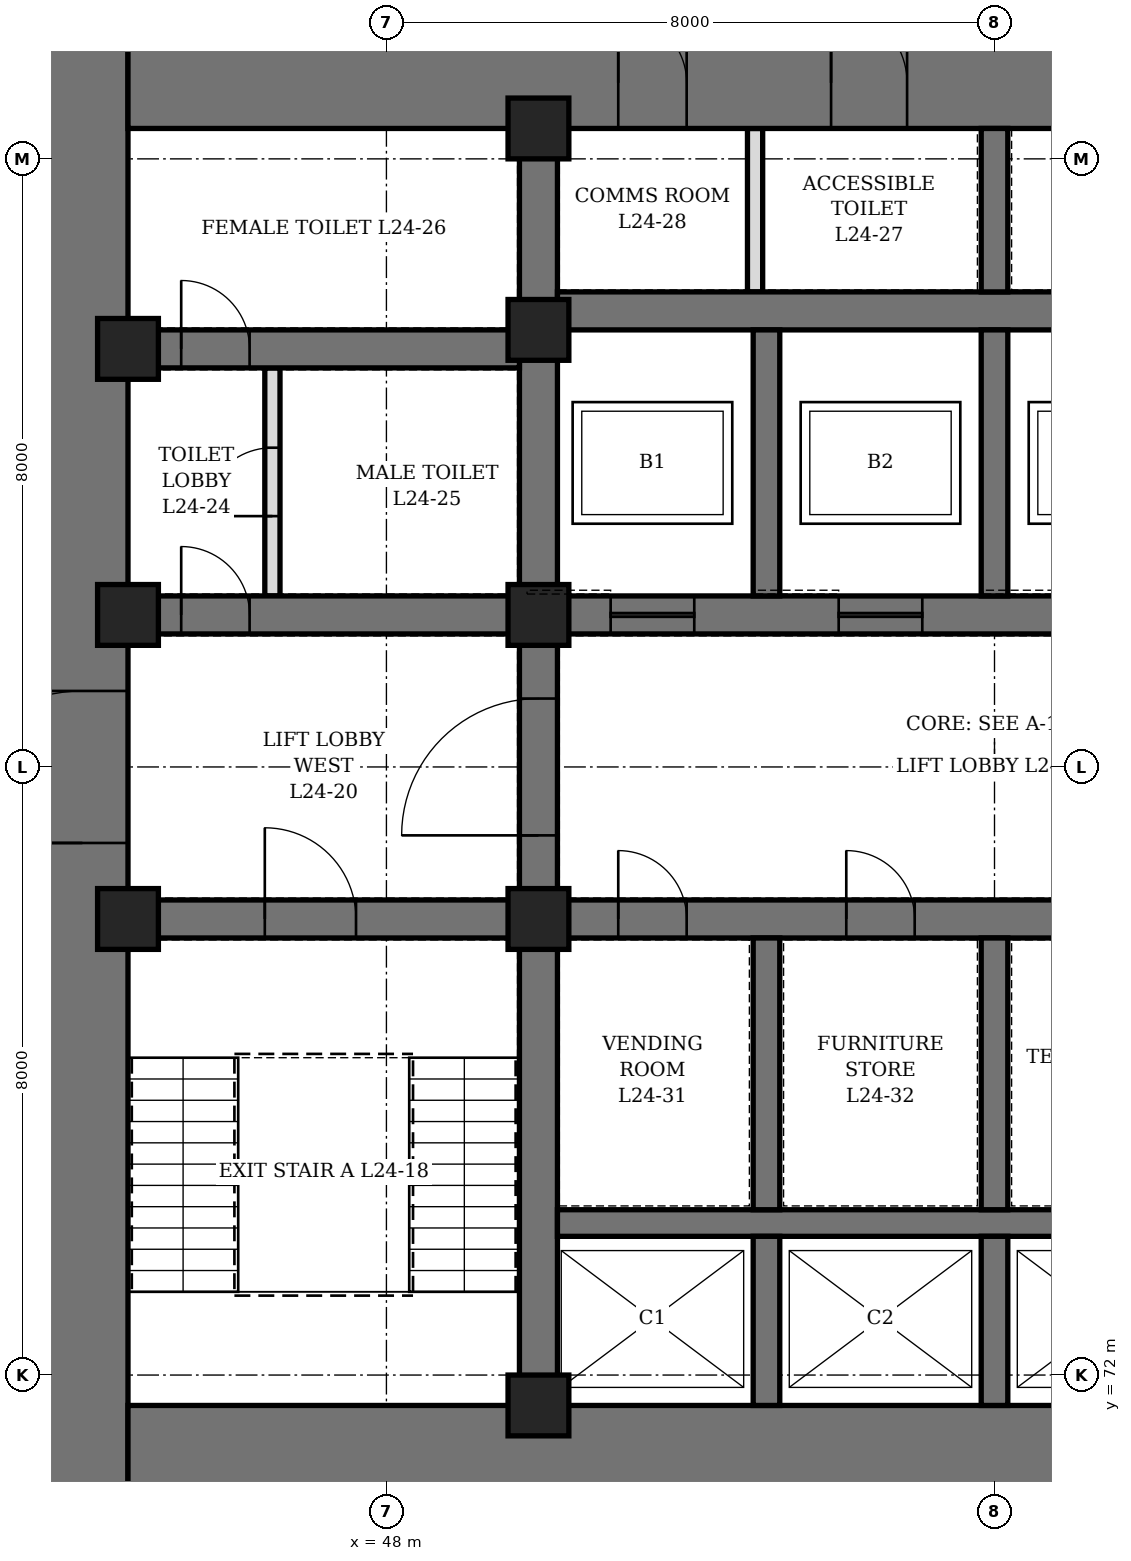
"""IFC4 building model, lengths in metres.
Left out: names, types, materials, properties, quantities, classifications, styles, units other than length and angle.
Written with IfcOpenShell. Run it as: python <this file> out.ifc"""

import sys

from ifc_helpers import new_model, si_unit, direction, frame, frame_2d, origin, origin_2d, place, context, subcontext, project, spatial, rectangle, hollow_rectangle, extrude, element, fill, save


model = new_model("IFC4")
c1 = context("Model", 3, precision=1e-05, world=origin(), true_north=direction((0.0, 1.0)))
c2 = subcontext(c1, "Body", "Model", "MODEL_VIEW")
j1 = project(units=[si_unit("LENGTHUNIT", "METRE"), si_unit("PLANEANGLEUNIT", "RADIAN")], contexts=[c1])
p1 = place(None, origin())
s1 = spatial("IfcSite", under=j1, at=p1, CompositionType="ELEMENT")
p2 = place(p1, origin())
s2 = spatial("IfcBuilding", under=s1, at=p2, CompositionType="ELEMENT")
p3 = place(p2, frame((0.0, 0.0, 112.3)))
s3 = spatial("IfcBuildingStorey", under=s2, at=p3, CompositionType="ELEMENT", Elevation=112.3)
p4 = place(p3, frame((44.0, 70.4, 0.0), z_axis=(0.0, 0.0, 1.0), x_axis=(0.0, 1.0, 0.0)))
e1 = element("IfcWall", 1, at=p4, inside=s3, PredefinedType="SHEAR", context=c2, shape_type="SweptSolid", body=[
    extrude(rectangle(XDim=19.2, YDim=1.2, at=frame_2d((9.6, 0.0))), origin(), (0.0, 0.0, 1.0), 4.2),
])
p5 = place(p4, frame((8.6, 0.0, 0.0)))
e2 = element("IfcOpeningElement", 2, at=p5, cuts=e1, PredefinedType="OPENING", context=c2, shape_type="SweptSolid", body=[
    extrude(rectangle(XDim=2.0, YDim=2.4, at=frame_2d((1.0, 1.2))), frame((0.0, 0.61, 0.0), z_axis=(0.0, -1.0, 0.0), x_axis=(1.0, 0.0, 0.0)), (0.0, 0.0, 1.0), 1.22),
])
p6 = place(p3, frame((44.6, 71.0, 0.0), z_axis=(0.0, 0.0, 1.0), x_axis=(1.0, 0.0, 0.0)))
e3 = element("IfcWall", 3, at=p6, inside=s3, PredefinedType="SHEAR", context=c2, shape_type="SweptSolid", body=[
    extrude(rectangle(XDim=22.8, YDim=1.2, at=frame_2d((11.4, 0.0))), origin(), (0.0, 0.0, 1.0), 4.2),
])
p7 = place(p3, frame((44.6, 89.0, 0.0), z_axis=(0.0, 0.0, 1.0), x_axis=(1.0, 0.0, 0.0)))
e4 = element("IfcWall", 4, at=p7, inside=s3, PredefinedType="SHEAR", context=c2, shape_type="SweptSolid", body=[
    extrude(rectangle(XDim=22.8, YDim=1.2, at=frame_2d((11.4, 0.0))), origin(), (0.0, 0.0, 1.0), 4.2),
])
p8 = place(p7, frame((9.25, 0.0, 0.0)))
e5 = element("IfcOpeningElement", 5, at=p8, cuts=e4, PredefinedType="OPENING", context=c2, shape_type="SweptSolid", body=[
    extrude(rectangle(XDim=1.0, YDim=2.1, at=frame_2d((0.5, 1.05))), frame((0.0, 0.61, 0.0), z_axis=(0.0, -1.0, 0.0), x_axis=(1.0, 0.0, 0.0)), (0.0, 0.0, 1.0), 1.22),
])
p9 = place(p7, frame((6.45, 0.0, 0.0)))
e6 = element("IfcOpeningElement", 6, at=p9, cuts=e4, PredefinedType="OPENING", context=c2, shape_type="SweptSolid", body=[
    extrude(rectangle(XDim=0.9, YDim=2.1, at=frame_2d((0.45, 1.05))), frame((0.0, 0.61, 0.0), z_axis=(0.0, -1.0, 0.0), x_axis=(1.0, 0.0, 0.0)), (0.0, 0.0, 1.0), 1.22),
])
p10 = place(p7, frame((13.025, 0.0, 0.0)))
e7 = element("IfcOpeningElement", 7, at=p10, cuts=e4, PredefinedType="OPENING", context=c2, shape_type="SweptSolid", body=[
    extrude(rectangle(XDim=0.9, YDim=2.1, at=frame_2d((0.45, 1.05))), frame((0.0, 0.61, 0.0), z_axis=(0.0, -1.0, 0.0), x_axis=(1.0, 0.0, 0.0)), (0.0, 0.0, 1.0), 1.22),
])
p11 = place(p3, frame((50.0, 71.6, 0.0), z_axis=(0.0, 0.0, 1.0), x_axis=(0.0, 1.0, 0.0)))
e8 = element("IfcWall", 8, at=p11, inside=s3, PredefinedType="SHEAR", context=c2, shape_type="SweptSolid", body=[
    extrude(rectangle(XDim=16.8, YDim=0.5, at=frame_2d((8.4, 0.0))), origin(), (0.0, 0.0, 1.0), 4.2),
])
p12 = place(p11, frame((7.5, 0.0, 0.0)))
e9 = element("IfcOpeningElement", 9, at=p12, cuts=e8, PredefinedType="OPENING", context=c2, shape_type="SweptSolid", body=[
    extrude(rectangle(XDim=1.8, YDim=2.4, at=frame_2d((0.9, 1.2))), frame((0.0, 0.26, 0.0), z_axis=(0.0, -1.0, 0.0), x_axis=(1.0, 0.0, 0.0)), (0.0, 0.0, 1.0), 0.52),
])
p13 = place(p3, frame((44.6, 78.0, 0.0), z_axis=(0.0, 0.0, 1.0), x_axis=(1.0, 0.0, 0.0)))
e10 = element("IfcWall", 10, at=p13, inside=s3, PredefinedType="SHEAR", context=c2, shape_type="SweptSolid", body=[
    extrude(rectangle(XDim=5.15, YDim=0.5, at=frame_2d((2.575, 0.0))), origin(), (0.0, 0.0, 1.0), 4.2),
])
p14 = place(p13, frame((1.8, 0.0, 0.0)))
e11 = element("IfcOpeningElement", 11, at=p14, cuts=e10, PredefinedType="OPENING", context=c2, shape_type="SweptSolid", body=[
    extrude(rectangle(XDim=1.2, YDim=2.1, at=frame_2d((0.6, 1.05))), frame((0.0, 0.26, 0.0), z_axis=(0.0, -1.0, 0.0), x_axis=(1.0, 0.0, 0.0)), (0.0, 0.0, 1.0), 0.52),
])
p15 = place(p3, frame((44.6, 82.0, 0.0), z_axis=(0.0, 0.0, 1.0), x_axis=(1.0, 0.0, 0.0)))
e12 = element("IfcWall", 12, at=p15, inside=s3, PredefinedType="SHEAR", context=c2, shape_type="SweptSolid", body=[
    extrude(rectangle(XDim=5.15, YDim=0.5, at=frame_2d((2.575, 0.0))), origin(), (0.0, 0.0, 1.0), 4.2),
])
p16 = place(p15, frame((0.7, 0.0, 0.0)))
e13 = element("IfcOpeningElement", 13, at=p16, cuts=e12, PredefinedType="OPENING", context=c2, shape_type="SweptSolid", body=[
    extrude(rectangle(XDim=0.9, YDim=2.1, at=frame_2d((0.45, 1.05))), frame((0.0, 0.26, 0.0), z_axis=(0.0, -1.0, 0.0), x_axis=(1.0, 0.0, 0.0)), (0.0, 0.0, 1.0), 0.52),
])
p17 = place(p3, frame((44.6, 85.5, 0.0), z_axis=(0.0, 0.0, 1.0), x_axis=(1.0, 0.0, 0.0)))
e14 = element("IfcWall", 14, at=p17, inside=s3, PredefinedType="SHEAR", context=c2, shape_type="SweptSolid", body=[
    extrude(rectangle(XDim=5.15, YDim=0.5, at=frame_2d((2.575, 0.0))), origin(), (0.0, 0.0, 1.0), 4.2),
])
p18 = place(p17, frame((0.7, 0.0, 0.0)))
e15 = element("IfcOpeningElement", 15, at=p18, cuts=e14, PredefinedType="OPENING", context=c2, shape_type="SweptSolid", body=[
    extrude(rectangle(XDim=0.9, YDim=2.1, at=frame_2d((0.45, 1.05))), frame((0.0, 0.26, 0.0), z_axis=(0.0, -1.0, 0.0), x_axis=(1.0, 0.0, 0.0)), (0.0, 0.0, 1.0), 0.52),
])
p19 = place(p3, frame((50.25, 78.0, 0.0), z_axis=(0.0, 0.0, 1.0), x_axis=(1.0, 0.0, 0.0)))
e16 = element("IfcWall", 16, at=p19, inside=s3, PredefinedType="SHEAR", context=c2, shape_type="SweptSolid", body=[
    extrude(rectangle(XDim=11.5, YDim=0.5, at=frame_2d((5.75, 0.0))), origin(), (0.0, 0.0, 1.0), 4.2),
])
p20 = place(p19, frame((0.8, 0.0, 0.0)))
e17 = element("IfcOpeningElement", 17, at=p20, cuts=e16, PredefinedType="OPENING", context=c2, shape_type="SweptSolid", body=[
    extrude(rectangle(XDim=0.9, YDim=2.1, at=frame_2d((0.45, 1.05))), frame((0.0, 0.26, 0.0), z_axis=(0.0, -1.0, 0.0), x_axis=(1.0, 0.0, 0.0)), (0.0, 0.0, 1.0), 0.52),
])
p21 = place(p19, frame((3.8, 0.0, 0.0)))
e18 = element("IfcOpeningElement", 18, at=p21, cuts=e16, PredefinedType="OPENING", context=c2, shape_type="SweptSolid", body=[
    extrude(rectangle(XDim=0.9, YDim=2.1, at=frame_2d((0.45, 1.05))), frame((0.0, 0.26, 0.0), z_axis=(0.0, -1.0, 0.0), x_axis=(1.0, 0.0, 0.0)), (0.0, 0.0, 1.0), 0.52),
])
p22 = place(p19, frame((6.8, 0.0, 0.0)))
e19 = element("IfcOpeningElement", 19, at=p22, cuts=e16, PredefinedType="OPENING", context=c2, shape_type="SweptSolid", body=[
    extrude(rectangle(XDim=0.9, YDim=2.1, at=frame_2d((0.45, 1.05))), frame((0.0, 0.26, 0.0), z_axis=(0.0, -1.0, 0.0), x_axis=(1.0, 0.0, 0.0)), (0.0, 0.0, 1.0), 0.52),
])
p23 = place(p19, frame((9.8, 0.0, 0.0)))
e20 = element("IfcOpeningElement", 20, at=p23, cuts=e16, PredefinedType="OPENING", context=c2, shape_type="SweptSolid", body=[
    extrude(rectangle(XDim=0.9, YDim=2.1, at=frame_2d((0.45, 1.05))), frame((0.0, 0.26, 0.0), z_axis=(0.0, -1.0, 0.0), x_axis=(1.0, 0.0, 0.0)), (0.0, 0.0, 1.0), 0.52),
])
p24 = place(p3, frame((50.25, 82.0, 0.0), z_axis=(0.0, 0.0, 1.0), x_axis=(1.0, 0.0, 0.0)))
e21 = element("IfcWall", 21, at=p24, inside=s3, PredefinedType="SHEAR", context=c2, shape_type="SweptSolid", body=[
    extrude(rectangle(XDim=11.5, YDim=0.5, at=frame_2d((5.75, 0.0))), origin(), (0.0, 0.0, 1.0), 4.2),
])
p25 = place(p24, frame((0.7, 0.0, 0.0)))
e22 = element("IfcOpeningElement", 22, at=p25, cuts=e21, PredefinedType="OPENING", context=c2, shape_type="SweptSolid", body=[
    extrude(rectangle(XDim=1.1, YDim=2.2, at=frame_2d((0.55, 1.1))), frame((0.0, 0.26, 0.0), z_axis=(0.0, -1.0, 0.0), x_axis=(1.0, 0.0, 0.0)), (0.0, 0.0, 1.0), 0.52),
])
p26 = place(p24, frame((3.7, 0.0, 0.0)))
e23 = element("IfcOpeningElement", 23, at=p26, cuts=e21, PredefinedType="OPENING", context=c2, shape_type="SweptSolid", body=[
    extrude(rectangle(XDim=1.1, YDim=2.2, at=frame_2d((0.55, 1.1))), frame((0.0, 0.26, 0.0), z_axis=(0.0, -1.0, 0.0), x_axis=(1.0, 0.0, 0.0)), (0.0, 0.0, 1.0), 0.52),
])
p27 = place(p24, frame((6.7, 0.0, 0.0)))
e24 = element("IfcOpeningElement", 24, at=p27, cuts=e21, PredefinedType="OPENING", context=c2, shape_type="SweptSolid", body=[
    extrude(rectangle(XDim=1.1, YDim=2.2, at=frame_2d((0.55, 1.1))), frame((0.0, 0.26, 0.0), z_axis=(0.0, -1.0, 0.0), x_axis=(1.0, 0.0, 0.0)), (0.0, 0.0, 1.0), 0.52),
])
p28 = place(p24, frame((9.7, 0.0, 0.0)))
e25 = element("IfcOpeningElement", 25, at=p28, cuts=e21, PredefinedType="OPENING", context=c2, shape_type="SweptSolid", body=[
    extrude(rectangle(XDim=1.1, YDim=2.2, at=frame_2d((0.55, 1.1))), frame((0.0, 0.26, 0.0), z_axis=(0.0, -1.0, 0.0), x_axis=(1.0, 0.0, 0.0)), (0.0, 0.0, 1.0), 0.52),
])
p29 = place(p3, frame((50.25, 86.0, 0.0), z_axis=(0.0, 0.0, 1.0), x_axis=(1.0, 0.0, 0.0)))
e26 = element("IfcWall", 26, at=p29, inside=s3, PredefinedType="SHEAR", context=c2, shape_type="SweptSolid", body=[
    extrude(rectangle(XDim=11.5, YDim=0.5, at=frame_2d((5.75, 0.0))), origin(), (0.0, 0.0, 1.0), 4.2),
])
p30 = place(p3, frame((50.25, 74.0, 0.0), z_axis=(0.0, 0.0, 1.0), x_axis=(1.0, 0.0, 0.0)))
e27 = element("IfcWall", 27, at=p30, inside=s3, PredefinedType="SHEAR", context=c2, shape_type="SweptSolid", body=[
    extrude(rectangle(XDim=11.5, YDim=0.35, at=frame_2d((5.75, 0.0))), origin(), (0.0, 0.0, 1.0), 4.2),
])
p31 = place(p3, frame((53.0, 71.6, 0.0), z_axis=(0.0, 0.0, 1.0), x_axis=(0.0, 1.0, 0.0)))
e28 = element("IfcWall", 28, at=p31, inside=s3, PredefinedType="SHEAR", context=c2, shape_type="SweptSolid", body=[
    extrude(rectangle(XDim=2.225, YDim=0.35, at=frame_2d((1.112, 0.0))), origin(), (0.0, 0.0, 1.0), 4.2),
])
p32 = place(p3, frame((53.0, 74.175, 0.0), z_axis=(0.0, 0.0, 1.0), x_axis=(0.0, 1.0, 0.0)))
e29 = element("IfcWall", 29, at=p32, inside=s3, PredefinedType="SHEAR", context=c2, shape_type="SweptSolid", body=[
    extrude(rectangle(XDim=3.575, YDim=0.35, at=frame_2d((1.788, 0.0))), origin(), (0.0, 0.0, 1.0), 4.2),
])
p33 = place(p3, frame((53.0, 82.25, 0.0), z_axis=(0.0, 0.0, 1.0), x_axis=(0.0, 1.0, 0.0)))
e30 = element("IfcWall", 30, at=p33, inside=s3, PredefinedType="SHEAR", context=c2, shape_type="SweptSolid", body=[
    extrude(rectangle(XDim=3.5, YDim=0.35, at=frame_2d((1.75, 0.0))), origin(), (0.0, 0.0, 1.0), 4.2),
])
p34 = place(p3, frame((56.0, 71.6, 0.0), z_axis=(0.0, 0.0, 1.0), x_axis=(0.0, 1.0, 0.0)))
e31 = element("IfcWall", 31, at=p34, inside=s3, PredefinedType="SHEAR", context=c2, shape_type="SweptSolid", body=[
    extrude(rectangle(XDim=2.225, YDim=0.35, at=frame_2d((1.112, 0.0))), origin(), (0.0, 0.0, 1.0), 4.2),
])
p35 = place(p3, frame((56.0, 74.175, 0.0), z_axis=(0.0, 0.0, 1.0), x_axis=(0.0, 1.0, 0.0)))
e32 = element("IfcWall", 32, at=p35, inside=s3, PredefinedType="SHEAR", context=c2, shape_type="SweptSolid", body=[
    extrude(rectangle(XDim=3.575, YDim=0.35, at=frame_2d((1.788, 0.0))), origin(), (0.0, 0.0, 1.0), 4.2),
])
p36 = place(p3, frame((56.0, 82.25, 0.0), z_axis=(0.0, 0.0, 1.0), x_axis=(0.0, 1.0, 0.0)))
e33 = element("IfcWall", 33, at=p36, inside=s3, PredefinedType="SHEAR", context=c2, shape_type="SweptSolid", body=[
    extrude(rectangle(XDim=3.5, YDim=0.35, at=frame_2d((1.75, 0.0))), origin(), (0.0, 0.0, 1.0), 4.2),
])
p37 = place(p3, frame((56.0, 86.25, 0.0), z_axis=(0.0, 0.0, 1.0), x_axis=(0.0, 1.0, 0.0)))
e34 = element("IfcWall", 34, at=p37, inside=s3, PredefinedType="SHEAR", context=c2, shape_type="SweptSolid", body=[
    extrude(rectangle(XDim=2.15, YDim=0.35, at=frame_2d((1.075, 0.0))), origin(), (0.0, 0.0, 1.0), 4.2),
])
for number, where, z_axis, x_axis in (
    (35, (44.6, 78.0, 0.0), (0.0, 0.0, 1.0), (1.0, 0.0, 0.0)),
    (36, (44.6, 82.0, 0.0), (0.0, 0.0, 1.0), (1.0, 0.0, 0.0)),
    (37, (44.6, 85.5, 0.0), (0.0, 0.0, 1.0), (1.0, 0.0, 0.0)),
    (38, (50.0, 71.6, 0.0), (0.0, 0.0, 1.0), (1.0, 0.0, 0.0)),
    (39, (50.0, 78.0, 0.0), (0.0, 0.0, 1.0), (1.0, 0.0, 0.0)),
    (40, (50.0, 82.0, 0.0), (0.0, 0.0, 1.0), (1.0, 0.0, 0.0)),
    (41, (50.0, 85.75, 0.0), (0.0, 0.0, 1.0), (1.0, 0.0, 0.0)),
    (42, (50.0, 88.4, 0.0), (0.0, 0.0, 1.0), (1.0, 0.0, 0.0)),
):
    element("IfcColumn", number, at=place(p3, frame(where, z_axis=z_axis, x_axis=x_axis)), inside=s3, PredefinedType="COLUMN", context=c2, shape_type="SweptSolid", body=[
        extrude(hollow_rectangle(XDim=0.8, YDim=0.8, WallThickness=0.1, at=origin_2d()), origin(), (0.0, 0.0, 1.0), 4.2),
    ])
p38 = place(p3, frame((46.5, 82.25, 0.0), z_axis=(0.0, 0.0, 1.0), x_axis=(0.0, 1.0, 0.0)))
e43 = element("IfcWall", 43, at=p38, inside=s3, PredefinedType="PARTITIONING", context=c2, shape_type="SweptSolid", body=[
    extrude(rectangle(XDim=3.0, YDim=0.2, at=frame_2d((1.5, 0.0))), origin(), (0.0, 0.0, 1.0), 4.04),
])
p39 = place(p38, frame((1.05, 0.0, 0.0)))
e44 = element("IfcOpeningElement", 44, at=p39, cuts=e43, PredefinedType="OPENING", context=c2, shape_type="SweptSolid", body=[
    extrude(rectangle(XDim=0.9, YDim=2.1, at=frame_2d((0.45, 1.05))), frame((0.0, 0.11, 0.0), z_axis=(0.0, -1.0, 0.0), x_axis=(1.0, 0.0, 0.0)), (0.0, 0.0, 1.0), 0.22),
])
p40 = place(p3, frame((52.85, 86.25, 0.0), z_axis=(0.0, 0.0, 1.0), x_axis=(0.0, 1.0, 0.0)))
e45 = element("IfcWall", 45, at=p40, inside=s3, PredefinedType="PARTITIONING", context=c2, shape_type="SweptSolid", body=[
    extrude(rectangle(XDim=2.15, YDim=0.2, at=frame_2d((1.075, 0.0))), origin(), (0.0, 0.0, 1.0), 2.54),
])
p41 = place(p16, origin())
e46 = element("IfcDoor", 46, at=p41, inside=s3, OperationType="SINGLE_SWING_LEFT", PredefinedType="DOOR", context=c2, shape_type="SweptSolid", body=[
    extrude(rectangle(XDim=0.9, YDim=2.1, at=frame_2d((0.45, 1.05))), frame((0.0, 0.25, 0.0), z_axis=(0.0, -1.0, 0.0), x_axis=(1.0, 0.0, 0.0)), (0.0, 0.0, 1.0), 0.5),
])
fill(e13, e46)
p42 = place(p39, origin())
e47 = element("IfcDoor", 47, at=p42, inside=s3, OperationType="SINGLE_SWING_RIGHT", PredefinedType="DOOR", context=c2, shape_type="SweptSolid", body=[
    extrude(rectangle(XDim=0.9, YDim=2.1, at=frame_2d((0.45, 1.05))), frame((0.0, 0.1, 0.0), z_axis=(0.0, -1.0, 0.0), x_axis=(1.0, 0.0, 0.0)), (0.0, 0.0, 1.0), 0.199),
])
fill(e44, e47)
p43 = place(p18, origin())
e48 = element("IfcDoor", 48, at=p43, inside=s3, OperationType="SINGLE_SWING_RIGHT", PredefinedType="DOOR", context=c2, shape_type="SweptSolid", body=[
    extrude(rectangle(XDim=0.9, YDim=2.1, at=frame_2d((0.45, 1.05))), frame((0.0, 0.25, 0.0), z_axis=(0.0, -1.0, 0.0), x_axis=(1.0, 0.0, 0.0)), (0.0, 0.0, 1.0), 0.5),
])
fill(e15, e48)
p44 = place(p8, origin())
e49 = element("IfcDoor", 49, at=p44, inside=s3, OperationType="SINGLE_SWING_LEFT", PredefinedType="DOOR", context=c2, shape_type="SweptSolid", body=[
    extrude(rectangle(XDim=1.0, YDim=2.1, at=frame_2d((0.5, 1.05))), frame((0.0, 0.35, 0.0), z_axis=(0.0, -1.0, 0.0), x_axis=(1.0, 0.0, 0.0)), (0.0, 0.0, 1.0), 0.7),
])
fill(e5, e49)
p45 = place(p9, origin())
e50 = element("IfcDoor", 50, at=p45, inside=s3, OperationType="SINGLE_SWING_LEFT", PredefinedType="DOOR", context=c2, shape_type="SweptSolid", body=[
    extrude(rectangle(XDim=0.9, YDim=2.1, at=frame_2d((0.45, 1.05))), frame((0.0, 0.35, 0.0), z_axis=(0.0, -1.0, 0.0), x_axis=(1.0, 0.0, 0.0)), (0.0, 0.0, 1.0), 0.7),
])
fill(e6, e50)
p46 = place(p20, origin())
e51 = element("IfcDoor", 51, at=p46, inside=s3, OperationType="SINGLE_SWING_LEFT", PredefinedType="DOOR", context=c2, shape_type="SweptSolid", body=[
    extrude(rectangle(XDim=0.9, YDim=2.1, at=frame_2d((0.45, 1.05))), frame((0.0, 0.25, 0.0), z_axis=(0.0, -1.0, 0.0), x_axis=(1.0, 0.0, 0.0)), (0.0, 0.0, 1.0), 0.5),
])
fill(e17, e51)
p47 = place(p21, origin())
e52 = element("IfcDoor", 52, at=p47, inside=s3, OperationType="SINGLE_SWING_LEFT", PredefinedType="DOOR", context=c2, shape_type="SweptSolid", body=[
    extrude(rectangle(XDim=0.9, YDim=2.1, at=frame_2d((0.45, 1.05))), frame((0.0, 0.25, 0.0), z_axis=(0.0, -1.0, 0.0), x_axis=(1.0, 0.0, 0.0)), (0.0, 0.0, 1.0), 0.5),
])
fill(e18, e52)
p48 = place(p14, origin())
e53 = element("IfcDoor", 53, at=p48, inside=s3, OperationType="SINGLE_SWING_LEFT", PredefinedType="DOOR", context=c2, shape_type="SweptSolid", body=[
    extrude(rectangle(XDim=1.2, YDim=2.1, at=frame_2d((0.6, 1.05))), frame((0.0, 0.25, 0.0), z_axis=(0.0, -1.0, 0.0), x_axis=(1.0, 0.0, 0.0)), (0.0, 0.0, 1.0), 0.5),
])
fill(e11, e53)
p49 = place(p5, origin())
e54 = element("IfcDoor", 54, at=p49, inside=s3, OperationType="DOUBLE_DOOR_SINGLE_SWING", PredefinedType="DOOR", context=c2, shape_type="SweptSolid", body=[
    extrude(rectangle(XDim=2.0, YDim=2.4, at=frame_2d((1.0, 1.2))), frame((0.0, 0.35, 0.0), z_axis=(0.0, -1.0, 0.0), x_axis=(1.0, 0.0, 0.0)), (0.0, 0.0, 1.0), 0.7),
])
fill(e2, e54)
p50 = place(p12, origin())
e55 = element("IfcDoor", 55, at=p50, inside=s3, OperationType="DOUBLE_DOOR_SINGLE_SWING", PredefinedType="DOOR", context=c2, shape_type="SweptSolid", body=[
    extrude(rectangle(XDim=1.8, YDim=2.4, at=frame_2d((0.9, 1.2))), frame((0.0, 0.25, 0.0), z_axis=(0.0, -1.0, 0.0), x_axis=(1.0, 0.0, 0.0)), (0.0, 0.0, 1.0), 0.5),
])
fill(e9, e55)
p51 = place(p25, origin())
e56 = element("IfcDoor", 56, at=p51, inside=s3, OperationType="SLIDING_TO_LEFT", PredefinedType="DOOR", context=c2, shape_type="SweptSolid", body=[
    extrude(rectangle(XDim=1.1, YDim=2.2, at=frame_2d((0.55, 1.1))), frame((0.0, 0.25, 0.0), z_axis=(0.0, -1.0, 0.0), x_axis=(1.0, 0.0, 0.0)), (0.0, 0.0, 1.0), 0.5),
])
fill(e22, e56)
p52 = place(p26, origin())
e57 = element("IfcDoor", 57, at=p52, inside=s3, OperationType="SLIDING_TO_LEFT", PredefinedType="DOOR", context=c2, shape_type="SweptSolid", body=[
    extrude(rectangle(XDim=1.1, YDim=2.2, at=frame_2d((0.55, 1.1))), frame((0.0, 0.25, 0.0), z_axis=(0.0, -1.0, 0.0), x_axis=(1.0, 0.0, 0.0)), (0.0, 0.0, 1.0), 0.5),
])
fill(e23, e57)
save(model, sys.argv[1])
